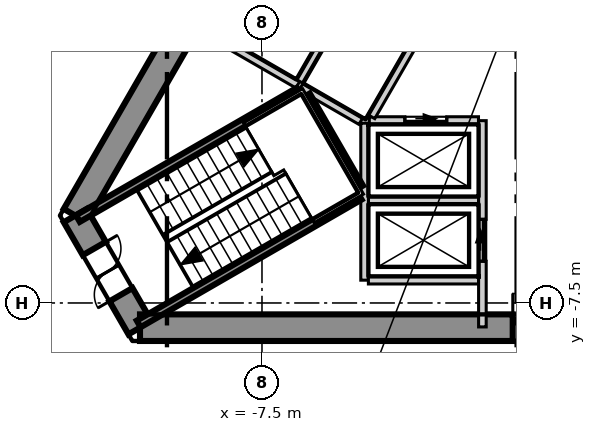
"""IFC4 building model, lengths in metres.
Left out: names, types, materials, properties, quantities, classifications, styles, units other than length and angle.
Written with IfcOpenShell. Run it as: python <this file> out.ifc"""

import sys

from ifc_helpers import new_model, si_unit, direction, frame, frame_2d, origin, place, context, subcontext, project, spatial, polyline, rectangle, outline, extrude, element, fill, save


model = new_model("IFC4")
c1 = context("Model", 3, precision=1e-05, world=origin(), true_north=direction((0.0, 1.0)))
c2 = subcontext(c1, "Body", "Model", "MODEL_VIEW")
j1 = project(units=[si_unit("LENGTHUNIT", "METRE"), si_unit("PLANEANGLEUNIT", "RADIAN")], contexts=[c1])
p1 = place(None, origin())
s1 = spatial("IfcSite", under=j1, at=p1, CompositionType="ELEMENT")
p2 = place(p1, origin())
s2 = spatial("IfcBuilding", under=s1, at=p2, CompositionType="ELEMENT")
p3 = place(p2, frame((0.0, 0.0, 203.3)))
s3 = spatial("IfcBuildingStorey", under=s2, at=p3, CompositionType="ELEMENT", Elevation=203.3)
p4 = place(p3, frame((-1.703, 13.35, -0.3), z_axis=(0.0, 0.0, 1.0), x_axis=(-0.500011533395, -0.866018744874, 0.0)))
e1 = element("IfcWall", 1, at=p4, inside=s3, PredefinedType="SHEAR", context=c2, shape_type="SweptSolid", body=[
    extrude(outline(polyline([(-0.202, -0.35), (1.782, -0.35), (3.766, -0.35), (5.75, -0.35), (7.734, -0.35), (9.718, -0.35), (11.702, -0.35), (13.686, -0.35), (15.67, -0.35), (17.654, -0.35), (19.638, -0.35), (21.622, -0.35), (21.218, 0.35), (19.307, 0.35), (17.397, 0.35), (15.486, 0.35), (13.576, 0.35), (11.665, 0.35), (9.755, 0.35), (7.844, 0.35), (5.934, 0.35), (4.023, 0.35), (2.113, 0.35), (0.202, 0.35), (-0.202, -0.35)])), origin(), (0.0, 0.0, 1.0), 4.0),
])
p5 = place(p4, frame((10.16, 0.0, 0.3)))
e2 = element("IfcOpeningElement", 2, at=p5, cuts=e1, PredefinedType="OPENING", context=c2, shape_type="SweptSolid", body=[
    extrude(rectangle(XDim=1.1, YDim=2.1, at=frame_2d((0.55, 1.05))), frame((0.0, 0.36, 0.0), z_axis=(0.0, -1.0, 0.0), x_axis=(1.0, 0.0, 0.0)), (0.0, 0.0, 1.0), 0.72),
])
p6 = place(p4, frame((4.055, 0.0, 0.3)))
e3 = element("IfcOpeningElement", 3, at=p6, cuts=e1, PredefinedType="OPENING", context=c2, shape_type="SweptSolid", body=[
    extrude(rectangle(XDim=0.9, YDim=2.1, at=frame_2d((0.45, 1.05))), frame((0.0, 0.36, 0.0), z_axis=(0.0, -1.0, 0.0), x_axis=(1.0, 0.0, 0.0)), (0.0, 0.0, 1.0), 0.72),
])
p7 = place(p3, frame((-12.413, -5.2, -0.3), z_axis=(0.0, 0.0, 1.0), x_axis=(0.49999337185, -0.866029230515, 0.0)))
e4 = element("IfcWall", 4, at=p7, inside=s3, PredefinedType="SHEAR", context=c2, shape_type="SweptSolid", body=[
    extrude(outline(polyline([(-0.202, -0.35), (1.703, -0.35), (3.608, -0.35), (3.204, 0.35), (1.703, 0.35), (0.202, 0.35), (-0.202, -0.35)])), origin(), (0.0, 0.0, 1.0), 4.0),
])
p8 = place(p7, frame((1.003, 0.0, 0.3)))
e5 = element("IfcOpeningElement", 5, at=p8, cuts=e4, PredefinedType="OPENING", context=c2, shape_type="SweptSolid", body=[
    extrude(rectangle(XDim=1.4, YDim=2.1, at=frame_2d((0.7, 1.05))), frame((0.0, 0.36, 0.0), z_axis=(0.0, -1.0, 0.0), x_axis=(1.0, 0.0, 0.0)), (0.0, 0.0, 1.0), 0.72),
])
p9 = place(p3, frame((-10.71, -8.15, -0.3), z_axis=(0.0, 0.0, 1.0), x_axis=(1.0, 0.0, 0.0)))
e6 = element("IfcWall", 6, at=p9, inside=s3, PredefinedType="SHEAR", context=c2, shape_type="SweptSolid", body=[
    extrude(outline(polyline([(-0.202, -0.35), (1.782, -0.35), (3.766, -0.35), (5.75, -0.35), (7.734, -0.35), (9.718, -0.35), (11.702, -0.35), (13.686, -0.35), (15.67, -0.35), (17.654, -0.35), (19.638, -0.35), (21.622, -0.35), (21.218, 0.35), (19.307, 0.35), (17.397, 0.35), (15.486, 0.35), (13.576, 0.35), (11.665, 0.35), (9.755, 0.35), (7.844, 0.35), (5.934, 0.35), (4.023, 0.35), (2.113, 0.35), (0.202, 0.35), (-0.202, -0.35)])), origin(), (0.0, 0.0, 1.0), 4.0),
])
p10 = place(p9, frame((9.81, 0.0, 0.3)))
e7 = element("IfcOpeningElement", 7, at=p10, cuts=e6, PredefinedType="OPENING", context=c2, shape_type="SweptSolid", body=[
    extrude(rectangle(XDim=1.8, YDim=2.1, at=frame_2d((0.9, 1.05))), frame((0.0, 0.36, 0.0), z_axis=(0.0, -1.0, 0.0), x_axis=(1.0, 0.0, 0.0)), (0.0, 0.0, 1.0), 0.72),
])
p11 = place(p3, frame((-2.824, 31.513, 0.0), z_axis=(0.0, 0.0, 1.0), x_axis=(-0.500012324412, -0.866018288165, 0.0)))
e8 = element("IfcWall", 8, at=p11, inside=s3, PredefinedType="ELEMENTEDWALL", context=c2, shape_type="SweptSolid", body=[
    extrude(rectangle(XDim=51.739, YDim=0.2, at=frame_2d((25.87, 0.0))), origin(), (0.0, 0.0, 1.0), 3.7),
])
p12 = place(p11, frame((2.275, 0.0, 0.9)))
e9 = element("IfcOpeningElement", 9, at=p12, cuts=e8, PredefinedType="OPENING", context=c2, shape_type="SweptSolid", body=[
    extrude(rectangle(XDim=4.2, YDim=2.5, at=frame_2d((2.1, 1.25))), frame((0.0, 0.11, 0.0), z_axis=(0.0, -1.0, 0.0), x_axis=(1.0, 0.0, 0.0)), (0.0, 0.0, 1.0), 0.22),
])
p13 = place(p11, frame((8.419, 0.0, 0.9)))
e10 = element("IfcOpeningElement", 10, at=p13, cuts=e8, PredefinedType="OPENING", context=c2, shape_type="SweptSolid", body=[
    extrude(rectangle(XDim=4.2, YDim=2.5, at=frame_2d((2.1, 1.25))), frame((0.0, 0.11, 0.0), z_axis=(0.0, -1.0, 0.0), x_axis=(1.0, 0.0, 0.0)), (0.0, 0.0, 1.0), 0.22),
])
p14 = place(p11, frame((14.563, 0.0, 0.9)))
e11 = element("IfcOpeningElement", 11, at=p14, cuts=e8, PredefinedType="OPENING", context=c2, shape_type="SweptSolid", body=[
    extrude(rectangle(XDim=4.2, YDim=2.5, at=frame_2d((2.1, 1.25))), frame((0.0, 0.11, 0.0), z_axis=(0.0, -1.0, 0.0), x_axis=(1.0, 0.0, 0.0)), (0.0, 0.0, 1.0), 0.22),
])
p15 = place(p11, frame((20.707, 0.0, 0.9)))
e12 = element("IfcOpeningElement", 12, at=p15, cuts=e8, PredefinedType="OPENING", context=c2, shape_type="SweptSolid", body=[
    extrude(rectangle(XDim=4.2, YDim=2.5, at=frame_2d((2.1, 1.25))), frame((0.0, 0.11, 0.0), z_axis=(0.0, -1.0, 0.0), x_axis=(1.0, 0.0, 0.0)), (0.0, 0.0, 1.0), 0.22),
])
p16 = place(p11, frame((26.851, 0.0, 0.9)))
e13 = element("IfcOpeningElement", 13, at=p16, cuts=e8, PredefinedType="OPENING", context=c2, shape_type="SweptSolid", body=[
    extrude(rectangle(XDim=4.2, YDim=2.5, at=frame_2d((2.1, 1.25))), frame((0.0, 0.11, 0.0), z_axis=(0.0, -1.0, 0.0), x_axis=(1.0, 0.0, 0.0)), (0.0, 0.0, 1.0), 0.22),
])
p17 = place(p11, frame((32.995, 0.0, 0.9)))
e14 = element("IfcOpeningElement", 14, at=p17, cuts=e8, PredefinedType="OPENING", context=c2, shape_type="SweptSolid", body=[
    extrude(rectangle(XDim=4.2, YDim=2.5, at=frame_2d((2.1, 1.25))), frame((0.0, 0.11, 0.0), z_axis=(0.0, -1.0, 0.0), x_axis=(1.0, 0.0, 0.0)), (0.0, 0.0, 1.0), 0.22),
])
p18 = place(p11, frame((39.14, 0.0, 0.9)))
e15 = element("IfcOpeningElement", 15, at=p18, cuts=e8, PredefinedType="OPENING", context=c2, shape_type="SweptSolid", body=[
    extrude(rectangle(XDim=4.2, YDim=2.5, at=frame_2d((2.1, 1.25))), frame((0.0, 0.11, 0.0), z_axis=(0.0, -1.0, 0.0), x_axis=(1.0, 0.0, 0.0)), (0.0, 0.0, 1.0), 0.22),
])
p19 = place(p11, frame((45.284, 0.0, 0.9)))
e16 = element("IfcOpeningElement", 16, at=p19, cuts=e8, PredefinedType="OPENING", context=c2, shape_type="SweptSolid", body=[
    extrude(rectangle(XDim=4.2, YDim=2.5, at=frame_2d((2.1, 1.25))), frame((0.0, 0.11, 0.0), z_axis=(0.0, -1.0, 0.0), x_axis=(1.0, 0.0, 0.0)), (0.0, 0.0, 1.0), 0.22),
])
p20 = place(p3, frame((-20.883, -11.97, 0.0), z_axis=(0.0, 0.0, 1.0), x_axis=(0.500006150555, 0.866021852731, 0.0)))
e17 = element("IfcWall", 17, at=p20, inside=s3, PredefinedType="PARTITIONING", context=c2, shape_type="SweptSolid", body=[
    extrude(rectangle(XDim=41.766, YDim=0.15, at=frame_2d((20.883, 0.0))), origin(), (0.0, 0.0, 1.0), 3.7),
])
p21 = place(p20, frame((36.916, 0.0, 0.0)))
e18 = element("IfcOpeningElement", 18, at=p21, cuts=e17, PredefinedType="OPENING", context=c2, shape_type="SweptSolid", body=[
    extrude(rectangle(XDim=1.1, YDim=2.1, at=frame_2d((0.55, 1.05))), frame((0.0, 0.085, 0.0), z_axis=(0.0, -1.0, 0.0), x_axis=(1.0, 0.0, 0.0)), (0.0, 0.0, 1.0), 0.17),
])
p22 = place(p20, frame((26.446, 0.0, 0.0)))
e19 = element("IfcOpeningElement", 19, at=p22, cuts=e17, PredefinedType="OPENING", context=c2, shape_type="SweptSolid", body=[
    extrude(rectangle(XDim=1.1, YDim=2.1, at=frame_2d((0.55, 1.05))), frame((0.0, 0.085, 0.0), z_axis=(0.0, -1.0, 0.0), x_axis=(1.0, 0.0, 0.0)), (0.0, 0.0, 1.0), 0.17),
])
p23 = place(p20, frame((9.757, 0.0, 0.0)))
e20 = element("IfcOpeningElement", 20, at=p23, cuts=e17, PredefinedType="OPENING", context=c2, shape_type="SweptSolid", body=[
    extrude(rectangle(XDim=1.1, YDim=2.1, at=frame_2d((0.55, 1.05))), frame((0.0, 0.085, 0.0), z_axis=(0.0, -1.0, 0.0), x_axis=(1.0, 0.0, 0.0)), (0.0, 0.0, 1.0), 0.17),
])
p24 = place(p20, frame((18.757, 0.0, 0.0)))
e21 = element("IfcOpeningElement", 21, at=p24, cuts=e17, PredefinedType="OPENING", context=c2, shape_type="SweptSolid", body=[
    extrude(rectangle(XDim=0.9, YDim=2.1, at=frame_2d((0.45, 1.05))), frame((0.0, 0.085, 0.0), z_axis=(0.0, -1.0, 0.0), x_axis=(1.0, 0.0, 0.0)), (0.0, 0.0, 1.0), 0.17),
])
p25 = place(p20, frame((15.557, 0.0, 0.0)))
e22 = element("IfcOpeningElement", 22, at=p25, cuts=e17, PredefinedType="OPENING", context=c2, shape_type="SweptSolid", body=[
    extrude(rectangle(XDim=0.9, YDim=2.1, at=frame_2d((0.45, 1.05))), frame((0.0, 0.085, 0.0), z_axis=(0.0, -1.0, 0.0), x_axis=(1.0, 0.0, 0.0)), (0.0, 0.0, 1.0), 0.17),
])
p26 = place(p20, frame((12.657, 0.0, 0.0)))
e23 = element("IfcOpeningElement", 23, at=p26, cuts=e17, PredefinedType="OPENING", context=c2, shape_type="SweptSolid", body=[
    extrude(rectangle(XDim=1.0, YDim=2.1, at=frame_2d((0.5, 1.05))), frame((0.0, 0.085, 0.0), z_axis=(0.0, -1.0, 0.0), x_axis=(1.0, 0.0, 0.0)), (0.0, 0.0, 1.0), 0.17),
])
p27 = place(p20, frame((3.669, 0.0, 0.0)))
e24 = element("IfcOpeningElement", 24, at=p27, cuts=e17, PredefinedType="OPENING", context=c2, shape_type="SweptSolid", body=[
    extrude(rectangle(XDim=1.1, YDim=2.1, at=frame_2d((0.55, 1.05))), frame((0.0, 0.085, 0.0), z_axis=(0.0, -1.0, 0.0), x_axis=(1.0, 0.0, 0.0)), (0.0, 0.0, 1.0), 0.17),
])
p28 = place(p3, frame((-8.376, -0.707, 0.0), z_axis=(0.0, 0.0, 1.0), x_axis=(0.866067520717, -0.499927044236, 0.0)))
e25 = element("IfcWall", 25, at=p28, inside=s3, PredefinedType="SOLIDWALL", context=c2, shape_type="SweptSolid", body=[
    extrude(rectangle(XDim=2.1, YDim=0.2, at=frame_2d((1.05, 0.0))), origin(), (0.0, 0.0, 1.0), 3.7),
])
p29 = place(p3, frame((-4.7, -4.8, 0.0), z_axis=(0.0, 0.0, 1.0), x_axis=(1.0, 0.0, 0.0)))
e26 = element("IfcWall", 26, at=p29, inside=s3, PredefinedType="SOLIDWALL", context=c2, shape_type="SweptSolid", body=[
    extrude(rectangle(XDim=2.9, YDim=0.2, at=frame_2d((1.45, 0.0))), origin(), (0.0, 0.0, 1.0), 3.7),
])
p30 = place(p3, frame((-4.8, -6.9, 0.0), z_axis=(0.0, 0.0, 1.0), x_axis=(0.0, 1.0, 0.0)))
e27 = element("IfcWall", 27, at=p30, inside=s3, PredefinedType="SOLIDWALL", context=c2, shape_type="SweptSolid", body=[
    extrude(rectangle(XDim=4.131, YDim=0.2, at=frame_2d((2.065, 0.0))), origin(), (0.0, 0.0, 1.0), 3.7),
])
p31 = place(p3, frame((-4.7, -6.9, 0.0), z_axis=(0.0, 0.0, 1.0), x_axis=(1.0, 0.0, 0.0)))
e28 = element("IfcWall", 28, at=p31, inside=s3, PredefinedType="SOLIDWALL", context=c2, shape_type="SweptSolid", body=[
    extrude(rectangle(XDim=2.9, YDim=0.2, at=frame_2d((1.45, 0.0))), origin(), (0.0, 0.0, 1.0), 3.7),
])
p32 = place(p3, frame((-1.7, -8.13, 0.0), z_axis=(0.0, 0.0, 1.0), x_axis=(0.0, 1.0, 0.0)))
e29 = element("IfcWall", 29, at=p32, inside=s3, PredefinedType="SOLIDWALL", context=c2, shape_type="SweptSolid", body=[
    extrude(rectangle(XDim=5.427, YDim=0.2, at=frame_2d((2.713, 0.0))), origin(), (0.0, 0.0, 1.0), 3.7),
])
p33 = place(p32, frame((1.73, 0.0, 0.0)))
e30 = element("IfcOpeningElement", 30, at=p33, cuts=e29, PredefinedType="OPENING", context=c2, shape_type="SweptSolid", body=[
    extrude(rectangle(XDim=1.1, YDim=2.1, at=frame_2d((0.55, 1.05))), frame((0.0, 0.11, 0.0), z_axis=(0.0, -1.0, 0.0), x_axis=(1.0, 0.0, 0.0)), (0.0, 0.0, 1.0), 0.22),
])
p34 = place(p3, frame((-4.676, -2.7, 0.0), z_axis=(0.0, 0.0, 1.0), x_axis=(1.0, 0.0, 0.0)))
e31 = element("IfcWall", 31, at=p34, inside=s3, PredefinedType="SOLIDWALL", context=c2, shape_type="SweptSolid", body=[
    extrude(rectangle(XDim=2.873, YDim=0.2, at=frame_2d((1.437, 0.0))), origin(), (0.0, 0.0, 1.0), 3.7),
])
p35 = place(p34, frame((0.937, 0.0, 0.0)))
e32 = element("IfcOpeningElement", 32, at=p35, cuts=e31, PredefinedType="OPENING", context=c2, shape_type="SweptSolid", body=[
    extrude(rectangle(XDim=1.1, YDim=2.1, at=frame_2d((0.55, 1.05))), frame((0.0, 0.11, 0.0), z_axis=(0.0, -1.0, 0.0), x_axis=(1.0, 0.0, 0.0)), (0.0, 0.0, 1.0), 0.22),
])
p36 = place(p3, frame((-6.507, -1.67, 0.0), z_axis=(0.0, 0.0, 1.0), x_axis=(0.50012328804, 0.865954211699, 0.0)))
e33 = element("IfcWall", 33, at=p36, inside=s3, PredefinedType="SOLIDWALL", context=c2, shape_type="SweptSolid", body=[
    extrude(rectangle(XDim=2.9, YDim=0.2, at=frame_2d((1.45, 0.0))), origin(), (0.0, 0.0, 1.0), 3.7),
])
p37 = place(p3, frame((-6.47, -1.807, 0.0), z_axis=(0.0, 0.0, 1.0), x_axis=(0.865883195159, -0.500246231712, 0.0)))
e34 = element("IfcWall", 34, at=p37, inside=s3, PredefinedType="SOLIDWALL", context=c2, shape_type="SweptSolid", body=[
    extrude(rectangle(XDim=1.815, YDim=0.2, at=frame_2d((0.908, 0.0))), origin(), (0.0, 0.0, 1.0), 3.7),
])
p38 = place(p3, frame((-4.619, -2.6, 0.0), z_axis=(0.0, 0.0, 1.0), x_axis=(0.50009492287, 0.865970593103, 0.0)))
e35 = element("IfcWall", 35, at=p38, inside=s3, PredefinedType="SOLIDWALL", context=c2, shape_type="SweptSolid", body=[
    extrude(rectangle(XDim=2.761, YDim=0.2, at=frame_2d((1.381, 0.0))), origin(), (0.0, 0.0, 1.0), 3.7),
])
p39 = place(p3, frame((-12.344, -5.279, 0.0), z_axis=(0.0, 0.0, 1.0), x_axis=(0.866046323291, 0.499963764601, 0.0)))
e36 = element("IfcWall", 36, at=p39, inside=s3, PredefinedType="SOLIDWALL", context=c2, shape_type="SweptSolid", body=[
    extrude(rectangle(XDim=6.714, YDim=0.2, at=frame_2d((3.357, 0.0))), origin(), (0.0, 0.0, 1.0), 3.7),
])
p40 = place(p3, frame((-6.329, -2.038, 0.0), z_axis=(0.0, 0.0, 1.0), x_axis=(0.500200581029, -0.865909567298, 0.0)))
e37 = element("IfcWall", 37, at=p40, inside=s3, PredefinedType="SOLIDWALL", context=c2, shape_type="SweptSolid", body=[
    extrude(rectangle(XDim=2.799, YDim=0.2, at=frame_2d((1.399, 0.0))), origin(), (0.0, 0.0, 1.0), 3.7),
])
p41 = place(p3, frame((-10.744, -8.051, 0.0), z_axis=(0.0, 0.0, 1.0), x_axis=(0.865983344943, 0.500072840975, 0.0)))
e38 = element("IfcWall", 38, at=p41, inside=s3, PredefinedType="SOLIDWALL", context=c2, shape_type="SweptSolid", body=[
    extrude(rectangle(XDim=6.715, YDim=0.2, at=frame_2d((3.357, 0.0))), origin(), (0.0, 0.0, 1.0), 3.7),
])
p42 = place(p35, origin())
e39 = element("IfcDoor", 39, at=p42, inside=s3, OperationType="SLIDING_TO_LEFT", PredefinedType="DOOR", context=c2, shape_type="SweptSolid", body=[
    extrude(rectangle(XDim=1.1, YDim=2.1, at=frame_2d((0.55, 1.05))), frame((0.0, 0.025, 0.0), z_axis=(0.0, -1.0, 0.0), x_axis=(1.0, 0.0, 0.0)), (0.0, 0.0, 1.0), 0.05),
])
fill(e32, e39)
p43 = place(p33, origin())
e40 = element("IfcDoor", 40, at=p43, inside=s3, OperationType="SLIDING_TO_LEFT", PredefinedType="DOOR", context=c2, shape_type="SweptSolid", body=[
    extrude(rectangle(XDim=1.1, YDim=2.1, at=frame_2d((0.55, 1.05))), frame((0.0, 0.025, 0.0), z_axis=(0.0, -1.0, 0.0), x_axis=(1.0, 0.0, 0.0)), (0.0, 0.0, 1.0), 0.05),
])
fill(e30, e40)
p44 = place(p10, origin())
e41 = element("IfcDoor", 41, at=p44, inside=s3, OperationType="DOUBLE_DOOR_SINGLE_SWING", PredefinedType="DOOR", context=c2, shape_type="SweptSolid", body=[
    extrude(rectangle(XDim=1.8, YDim=2.1, at=frame_2d((0.9, 1.05))), frame((0.0, 0.025, 0.0), z_axis=(0.0, -1.0, 0.0), x_axis=(1.0, 0.0, 0.0)), (0.0, 0.0, 1.0), 0.05),
])
fill(e7, e41)
p45 = place(p8, origin())
e42 = element("IfcDoor", 42, at=p45, inside=s3, OperationType="DOUBLE_DOOR_SINGLE_SWING", PredefinedType="DOOR", context=c2, shape_type="SweptSolid", body=[
    extrude(rectangle(XDim=1.4, YDim=2.1, at=frame_2d((0.7, 1.05))), frame((0.0, 0.025, 0.0), z_axis=(0.0, -1.0, 0.0), x_axis=(1.0, 0.0, 0.0)), (0.0, 0.0, 1.0), 0.05),
])
fill(e5, e42)
save(model, sys.argv[1])
